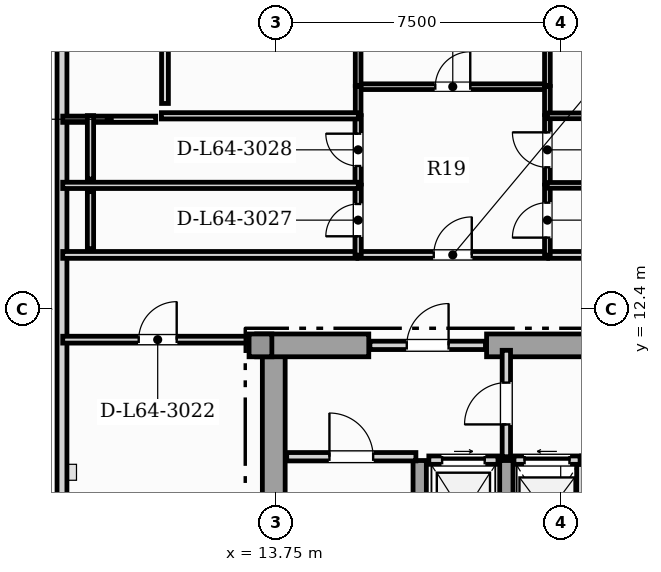
"""IFC4 building model, lengths in metres.
Left out: names, types, materials, properties, quantities, classifications, styles, units other than length and angle.
Written with IfcOpenShell. Run it as: python <this file> out.ifc"""

import sys

from ifc_helpers import new_model, si_unit, direction, frame, frame_2d, origin, origin_2d, place, context, subcontext, project, spatial, rectangle, extrude, element, fill, save


model = new_model("IFC4")
c1 = context("Model", 3, precision=1e-05, world=origin(), true_north=direction((0.0, 1.0)))
c2 = subcontext(c1, "Body", "Model", "MODEL_VIEW")
j1 = project(units=[si_unit("LENGTHUNIT", "METRE"), si_unit("PLANEANGLEUNIT", "RADIAN")], contexts=[c1])
p1 = place(None, origin())
s1 = spatial("IfcSite", under=j1, at=p1, CompositionType="ELEMENT")
p2 = place(p1, origin())
s2 = spatial("IfcBuilding", under=s1, at=p2, CompositionType="ELEMENT")
p3 = place(p2, frame((0.0, 0.0, 260.6)))
s3 = spatial("IfcBuildingStorey", under=s2, at=p3, CompositionType="ELEMENT", Elevation=260.6)
p4 = place(p3, frame((13.7, 0.92, 0.0), z_axis=(0.0, 0.0, 1.0), x_axis=(0.0, 1.0, 0.0)))
e1 = element("IfcWall", 1, at=p4, inside=s3, PredefinedType="SHEAR", context=c2, shape_type="SweptSolid", body=[
    extrude(rectangle(XDim=10.53, YDim=0.6, at=frame_2d((5.265, 0.0))), origin(), (0.0, 0.0, 1.0), 3.65),
])
p5 = place(p3, frame((13.25, 11.45, 0.0), z_axis=(0.0, 0.0, 1.0), x_axis=(1.0, 0.0, 0.0)))
e2 = element("IfcWall", 2, at=p5, inside=s3, PredefinedType="SHEAR", context=c2, shape_type="SweptSolid", body=[
    extrude(rectangle(XDim=2.95, YDim=0.6, at=frame_2d((1.475, 0.0))), origin(), (0.0, 0.0, 1.0), 3.65),
])
p6 = place(p3, frame((19.3, 11.45, 0.0), z_axis=(0.0, 0.0, 1.0), x_axis=(1.0, 0.0, 0.0)))
e3 = element("IfcWall", 3, at=p6, inside=s3, PredefinedType="SHEAR", context=c2, shape_type="SweptSolid", body=[
    extrude(rectangle(XDim=7.3, YDim=0.6, at=frame_2d((3.65, 0.0))), origin(), (0.0, 0.0, 1.0), 3.65),
])
for number, where, z_axis, x_axis in (
    (4, (17.54, 0.92, 0.0), (0.0, 0.0, 1.0), (0.0, 1.0, 0.0)),
    (5, (19.82, 0.92, 0.0), (0.0, 0.0, 1.0), (0.0, 1.0, 0.0)),
):
    element("IfcWall", number, at=place(p3, frame(where, z_axis=z_axis, x_axis=x_axis)), inside=s3, PredefinedType="SHEAR", context=c2, shape_type="SweptSolid", body=[
        extrude(rectangle(XDim=7.5, YDim=0.35, at=frame_2d((3.75, 0.0))), origin(), (0.0, 0.0, 1.0), 3.65),
    ])
p7 = place(p3, frame((13.35, 11.45, 0.0), z_axis=(0.0, 0.0, 1.0), x_axis=(1.0, 0.0, 0.0)))
e6 = element("IfcColumn", 6, at=p7, inside=s3, PredefinedType="COLUMN", context=c2, shape_type="SweptSolid", body=[
    extrude(rectangle(XDim=0.6, YDim=0.6, at=origin_2d()), origin(), (0.0, 0.0, 1.0), 3.85),
])
p8 = place(p3, frame((8.128, 20.34, 0.0), z_axis=(0.0, 0.0, 1.0), x_axis=(0.0, -1.0, 0.0)))
e7 = element("IfcWall", 7, at=p8, inside=s3, PredefinedType="SOLIDWALL", context=c2, shape_type="SweptSolid", body=[
    extrude(rectangle(XDim=17.1, YDim=0.26, at=frame_2d((8.55, 0.0))), origin(), (0.0, 0.0, 1.0), 3.65),
])
p9 = place(p8, frame((15.42, 0.0, 0.95)))
e8 = element("IfcOpeningElement", 8, at=p9, cuts=e7, PredefinedType="OPENING", context=c2, shape_type="SweptSolid", body=[
    extrude(rectangle(XDim=0.9, YDim=1.5, at=frame_2d((0.45, 0.75))), frame((0.0, 0.14, 0.0), z_axis=(0.0, -1.0, 0.0), x_axis=(1.0, 0.0, 0.0)), (0.0, 0.0, 1.0), 0.28),
])
p10 = place(p3, frame((17.78, 8.43, 0.0), z_axis=(0.0, 0.0, 1.0), x_axis=(1.0, 0.0, 0.0)))
e9 = element("IfcWall", 9, at=p10, inside=s3, PredefinedType="SOLIDWALL", context=c2, shape_type="SweptSolid", body=[
    extrude(rectangle(XDim=1.82, YDim=0.22, at=frame_2d((0.91, 0.0))), origin(), (0.0, 0.0, 1.0), 3.65),
])
p11 = place(p10, frame((0.35, 0.0, 0.0)))
e10 = element("IfcOpeningElement", 10, at=p11, cuts=e9, PredefinedType="OPENING", context=c2, shape_type="SweptSolid", body=[
    extrude(rectangle(XDim=1.12, YDim=2.25, at=frame_2d((0.56, 1.125))), frame((0.0, 0.12, 0.0), z_axis=(0.0, -1.0, 0.0), x_axis=(1.0, 0.0, 0.0)), (0.0, 0.0, 1.0), 0.24),
])
p12 = place(p3, frame((21.78, 5.65, 0.0), z_axis=(0.0, 0.0, 1.0), x_axis=(0.0, 1.0, 0.0)))
e11 = element("IfcWall", 11, at=p12, inside=s3, PredefinedType="SOLIDWALL", context=c2, shape_type="SweptSolid", body=[
    extrude(rectangle(XDim=2.7, YDim=0.22, at=frame_2d((1.35, 0.0))), origin(), (0.0, 0.0, 1.0), 3.65),
])
p13 = place(p3, frame((20.02, 8.43, 0.0), z_axis=(0.0, 0.0, 1.0), x_axis=(1.0, 0.0, 0.0)))
e12 = element("IfcWall", 12, at=p13, inside=s3, PredefinedType="SOLIDWALL", context=c2, shape_type="SweptSolid", body=[
    extrude(rectangle(XDim=1.74, YDim=0.22, at=frame_2d((0.87, 0.0))), origin(), (0.0, 0.0, 1.0), 3.65),
])
p14 = place(p13, frame((0.28, 0.0, 0.0)))
e13 = element("IfcOpeningElement", 13, at=p14, cuts=e12, PredefinedType="OPENING", context=c2, shape_type="SweptSolid", body=[
    extrude(rectangle(XDim=1.18, YDim=2.2, at=frame_2d((0.59, 1.1))), frame((0.0, 0.12, 0.0), z_axis=(0.0, -1.0, 0.0), x_axis=(1.0, 0.0, 0.0)), (0.0, 0.0, 1.0), 0.24),
])
p15 = place(p3, frame((21.8, 8.43, 0.0), z_axis=(0.0, 0.0, 1.0), x_axis=(1.0, 0.0, 0.0)))
e14 = element("IfcWall", 14, at=p15, inside=s3, PredefinedType="SOLIDWALL", context=c2, shape_type="SweptSolid", body=[
    extrude(rectangle(XDim=1.74, YDim=0.22, at=frame_2d((0.87, 0.0))), origin(), (0.0, 0.0, 1.0), 3.65),
])
p16 = place(p15, frame((0.28, 0.0, 0.0)))
e15 = element("IfcOpeningElement", 15, at=p16, cuts=e14, PredefinedType="OPENING", context=c2, shape_type="SweptSolid", body=[
    extrude(rectangle(XDim=1.18, YDim=2.2, at=frame_2d((0.59, 1.1))), frame((0.0, 0.12, 0.0), z_axis=(0.0, -1.0, 0.0), x_axis=(1.0, 0.0, 0.0)), (0.0, 0.0, 1.0), 0.24),
])
p17 = place(p3, frame((14.04, 8.52, 0.0), z_axis=(0.0, 0.0, 1.0), x_axis=(1.0, 0.0, 0.0)))
e16 = element("IfcWall", 16, at=p17, inside=s3, PredefinedType="SOLIDWALL", context=c2, shape_type="SweptSolid", body=[
    extrude(rectangle(XDim=3.4, YDim=0.22, at=frame_2d((1.7, 0.0))), origin(), (0.0, 0.0, 1.0), 3.65),
])
p18 = place(p17, frame((1.125, 0.0, 0.0)))
e17 = element("IfcOpeningElement", 17, at=p18, cuts=e16, PredefinedType="OPENING", context=c2, shape_type="SweptSolid", body=[
    extrude(rectangle(XDim=1.15, YDim=2.2, at=frame_2d((0.575, 1.1))), frame((0.0, 0.12, 0.0), z_axis=(0.0, -1.0, 0.0), x_axis=(1.0, 0.0, 0.0)), (0.0, 0.0, 1.0), 0.24),
])
p19 = place(p3, frame((19.82, 8.52, 0.0), z_axis=(0.0, 0.0, 1.0), x_axis=(0.0, 1.0, 0.0)))
e18 = element("IfcWall", 18, at=p19, inside=s3, PredefinedType="SOLIDWALL", context=c2, shape_type="SweptSolid", body=[
    extrude(rectangle(XDim=2.8, YDim=0.22, at=frame_2d((1.4, 0.0))), origin(), (0.0, 0.0, 1.0), 3.105),
])
p20 = place(p19, frame((0.85, 0.0, 0.0)))
e19 = element("IfcOpeningElement", 19, at=p20, cuts=e18, PredefinedType="OPENING", context=c2, shape_type="SweptSolid", body=[
    extrude(rectangle(XDim=1.1, YDim=2.2, at=frame_2d((0.55, 1.1))), frame((0.0, 0.12, 0.0), z_axis=(0.0, -1.0, 0.0), x_axis=(1.0, 0.0, 0.0)), (0.0, 0.0, 1.0), 0.24),
])
p21 = place(p3, frame((16.23, 11.45, 0.0), z_axis=(0.0, 0.0, 1.0), x_axis=(1.0, 0.0, 0.0)))
e20 = element("IfcWall", 20, at=p21, inside=s3, PredefinedType="SOLIDWALL", context=c2, shape_type="SweptSolid", body=[
    extrude(rectangle(XDim=3.04, YDim=0.22, at=frame_2d((1.52, 0.0))), origin(), (0.0, 0.0, 1.0), 3.65),
])
p22 = place(p21, frame((0.97, 0.0, 0.0)))
e21 = element("IfcOpeningElement", 21, at=p22, cuts=e20, PredefinedType="OPENING", context=c2, shape_type="SweptSolid", body=[
    extrude(rectangle(XDim=1.1, YDim=2.2, at=frame_2d((0.55, 1.1))), frame((0.0, 0.12, 0.0), z_axis=(0.0, -1.0, 0.0), x_axis=(1.0, 0.0, 0.0)), (0.0, 0.0, 1.0), 0.24),
])
p23 = place(p3, frame((8.147, 11.6, 0.0), z_axis=(0.0, 0.0, 1.0), x_axis=(1.0, 0.0, 0.0)))
e22 = element("IfcWall", 22, at=p23, inside=s3, PredefinedType="PARTITIONING", context=c2, shape_type="SweptSolid", body=[
    extrude(rectangle(XDim=4.998, YDim=0.18, at=frame_2d((2.499, 0.0))), origin(), (0.0, 0.0, 1.0), 3.65),
])
p24 = place(p23, frame((1.999, 0.0, 0.0)))
e23 = element("IfcOpeningElement", 23, at=p24, cuts=e22, PredefinedType="OPENING", context=c2, shape_type="SweptSolid", body=[
    extrude(rectangle(XDim=1.0, YDim=2.15, at=frame_2d((0.5, 1.075))), frame((0.0, 0.1, 0.0), z_axis=(0.0, -1.0, 0.0), x_axis=(1.0, 0.0, 0.0)), (0.0, 0.0, 1.0), 0.2),
])
p25 = place(p3, frame((15.915, 13.83, 0.0), z_axis=(0.0, 0.0, 1.0), x_axis=(1.0, 0.0, 0.0)))
e24 = element("IfcWall", 24, at=p25, inside=s3, PredefinedType="PARTITIONING", context=c2, shape_type="SweptSolid", body=[
    extrude(rectangle(XDim=4.99, YDim=0.18, at=frame_2d((2.495, 0.0))), origin(), (0.0, 0.0, 1.0), 3.65),
])
p26 = place(p25, frame((1.995, 0.0, 0.0)))
e25 = element("IfcOpeningElement", 25, at=p26, cuts=e24, PredefinedType="OPENING", context=c2, shape_type="SweptSolid", body=[
    extrude(rectangle(XDim=1.0, YDim=2.15, at=frame_2d((0.5, 1.075))), frame((0.0, 0.1, 0.0), z_axis=(0.0, -1.0, 0.0), x_axis=(1.0, 0.0, 0.0)), (0.0, 0.0, 1.0), 0.2),
])
p27 = place(p3, frame((8.147, 13.83, 0.0), z_axis=(0.0, 0.0, 1.0), x_axis=(1.0, 0.0, 0.0)))
e26 = element("IfcWall", 26, at=p27, inside=s3, PredefinedType="PARTITIONING", context=c2, shape_type="SweptSolid", body=[
    extrude(rectangle(XDim=7.738, YDim=0.18, at=frame_2d((3.869, 0.0))), origin(), (0.0, 0.0, 1.0), 3.65),
])
p28 = place(p3, frame((20.935, 13.83, 0.0), z_axis=(0.0, 0.0, 1.0), x_axis=(1.0, 0.0, 0.0)))
e27 = element("IfcWall", 27, at=p28, inside=s3, PredefinedType="PARTITIONING", context=c2, shape_type="SweptSolid", body=[
    extrude(rectangle(XDim=7.103, YDim=0.18, at=frame_2d((3.551, 0.0))), origin(), (0.0, 0.0, 1.0), 3.65),
])
p29 = place(p3, frame((15.915, 18.256, 0.0), z_axis=(0.0, 0.0, 1.0), x_axis=(1.0, 0.0, 0.0)))
e28 = element("IfcWall", 28, at=p29, inside=s3, PredefinedType="PARTITIONING", context=c2, shape_type="SweptSolid", body=[
    extrude(rectangle(XDim=4.99, YDim=0.15, at=frame_2d((2.495, 0.0))), origin(), (0.0, 0.0, 1.0), 3.65),
])
p30 = place(p29, frame((2.035, 0.0, 0.0)))
e29 = element("IfcOpeningElement", 29, at=p30, cuts=e28, PredefinedType="OPENING", context=c2, shape_type="SweptSolid", body=[
    extrude(rectangle(XDim=0.92, YDim=2.1, at=frame_2d((0.46, 1.05))), frame((0.0, 0.085, 0.0), z_axis=(0.0, -1.0, 0.0), x_axis=(1.0, 0.0, 0.0)), (0.0, 0.0, 1.0), 0.17),
])
p31 = place(p3, frame((15.92, 13.825, 0.0), z_axis=(0.0, 0.0, 1.0), x_axis=(0.0, 1.0, 0.0)))
e30 = element("IfcWall", 30, at=p31, inside=s3, PredefinedType="PLUMBINGWALL", context=c2, shape_type="SweptSolid", body=[
    extrude(rectangle(XDim=1.84, YDim=0.165, at=frame_2d((0.92, 0.0))), origin(), (0.0, 0.0, 1.0), 3.65),
])
p32 = place(p31, frame((0.495, 0.0, 0.0)))
e31 = element("IfcOpeningElement", 31, at=p32, cuts=e30, PredefinedType="OPENING", context=c2, shape_type="SweptSolid", body=[
    extrude(rectangle(XDim=0.85, YDim=2.1, at=frame_2d((0.425, 1.05))), frame((0.0, 0.093, 0.0), z_axis=(0.0, -1.0, 0.0), x_axis=(1.0, 0.0, 0.0)), (0.0, 0.0, 1.0), 0.185),
])
p33 = place(p3, frame((15.92, 15.695, 0.0), z_axis=(0.0, 0.0, 1.0), x_axis=(0.0, 1.0, 0.0)))
e32 = element("IfcWall", 32, at=p33, inside=s3, PredefinedType="PLUMBINGWALL", context=c2, shape_type="SweptSolid", body=[
    extrude(rectangle(XDim=1.8, YDim=0.165, at=frame_2d((0.9, 0.0))), origin(), (0.0, 0.0, 1.0), 3.65),
])
p34 = place(p33, frame((0.475, 0.0, 0.0)))
e33 = element("IfcOpeningElement", 33, at=p34, cuts=e32, PredefinedType="OPENING", context=c2, shape_type="SweptSolid", body=[
    extrude(rectangle(XDim=0.85, YDim=2.1, at=frame_2d((0.425, 1.05))), frame((0.0, 0.093, 0.0), z_axis=(0.0, -1.0, 0.0), x_axis=(1.0, 0.0, 0.0)), (0.0, 0.0, 1.0), 0.185),
])
p35 = place(p3, frame((15.92, 17.525, 0.0), z_axis=(0.0, 0.0, 1.0), x_axis=(0.0, 1.0, 0.0)))
e34 = element("IfcWall", 34, at=p35, inside=s3, PredefinedType="PARTITIONING", context=c2, shape_type="SweptSolid", body=[
    extrude(rectangle(XDim=0.736, YDim=0.15, at=frame_2d((0.368, 0.0))), origin(), (0.0, 0.0, 1.0), 3.65),
])
p36 = place(p3, frame((20.9, 13.825, 0.0), z_axis=(0.0, 0.0, 1.0), x_axis=(0.0, 1.0, 0.0)))
e35 = element("IfcWall", 35, at=p36, inside=s3, PredefinedType="PARTITIONING", context=c2, shape_type="SweptSolid", body=[
    extrude(rectangle(XDim=1.84, YDim=0.15, at=frame_2d((0.92, 0.0))), origin(), (0.0, 0.0, 1.0), 3.65),
])
p37 = place(p36, frame((0.46, 0.0, 0.0)))
e36 = element("IfcOpeningElement", 36, at=p37, cuts=e35, PredefinedType="OPENING", context=c2, shape_type="SweptSolid", body=[
    extrude(rectangle(XDim=0.92, YDim=2.1, at=frame_2d((0.46, 1.05))), frame((0.0, 0.085, 0.0), z_axis=(0.0, -1.0, 0.0), x_axis=(1.0, 0.0, 0.0)), (0.0, 0.0, 1.0), 0.17),
])
p38 = place(p3, frame((20.9, 15.695, 0.0), z_axis=(0.0, 0.0, 1.0), x_axis=(0.0, 1.0, 0.0)))
e37 = element("IfcWall", 37, at=p38, inside=s3, PredefinedType="PARTITIONING", context=c2, shape_type="SweptSolid", body=[
    extrude(rectangle(XDim=1.8, YDim=0.15, at=frame_2d((0.9, 0.0))), origin(), (0.0, 0.0, 1.0), 3.65),
])
p39 = place(p38, frame((0.44, 0.0, 0.0)))
e38 = element("IfcOpeningElement", 38, at=p39, cuts=e37, PredefinedType="OPENING", context=c2, shape_type="SweptSolid", body=[
    extrude(rectangle(XDim=0.92, YDim=2.1, at=frame_2d((0.46, 1.05))), frame((0.0, 0.085, 0.0), z_axis=(0.0, -1.0, 0.0), x_axis=(1.0, 0.0, 0.0)), (0.0, 0.0, 1.0), 0.17),
])
p40 = place(p3, frame((20.9, 17.525, 0.0), z_axis=(0.0, 0.0, 1.0), x_axis=(0.0, 1.0, 0.0)))
e39 = element("IfcWall", 39, at=p40, inside=s3, PredefinedType="PARTITIONING", context=c2, shape_type="SweptSolid", body=[
    extrude(rectangle(XDim=0.736, YDim=0.15, at=frame_2d((0.368, 0.0))), origin(), (0.0, 0.0, 1.0), 3.65),
])
p41 = place(p3, frame((15.92, 18.291, 0.0), z_axis=(0.0, 0.0, 1.0), x_axis=(0.0, 1.0, 0.0)))
e40 = element("IfcWall", 40, at=p41, inside=s3, PredefinedType="PARTITIONING", context=c2, shape_type="SweptSolid", body=[
    extrude(rectangle(XDim=8.714, YDim=0.15, at=frame_2d((4.357, 0.0))), origin(), (0.0, 0.0, 1.0), 3.65),
])
p42 = place(p41, frame((3.897, 0.0, 0.0)))
e41 = element("IfcOpeningElement", 41, at=p42, cuts=e40, PredefinedType="OPENING", context=c2, shape_type="SweptSolid", body=[
    extrude(rectangle(XDim=0.92, YDim=2.1, at=frame_2d((0.46, 1.05))), frame((0.0, 0.085, 0.0), z_axis=(0.0, -1.0, 0.0), x_axis=(1.0, 0.0, 0.0)), (0.0, 0.0, 1.0), 0.17),
])
p43 = place(p3, frame((20.9, 18.291, 0.0), z_axis=(0.0, 0.0, 1.0), x_axis=(0.0, 1.0, 0.0)))
e42 = element("IfcWall", 42, at=p43, inside=s3, PredefinedType="PARTITIONING", context=c2, shape_type="SweptSolid", body=[
    extrude(rectangle(XDim=3.182, YDim=0.15, at=frame_2d((1.591, 0.0))), origin(), (0.0, 0.0, 1.0), 3.65),
])
p44 = place(p43, frame((1.131, 0.0, 0.0)))
e43 = element("IfcOpeningElement", 43, at=p44, cuts=e42, PredefinedType="OPENING", context=c2, shape_type="SweptSolid", body=[
    extrude(rectangle(XDim=0.92, YDim=2.1, at=frame_2d((0.46, 1.05))), frame((0.0, 0.085, 0.0), z_axis=(0.0, -1.0, 0.0), x_axis=(1.0, 0.0, 0.0)), (0.0, 0.0, 1.0), 0.17),
])
p45 = place(p3, frame((8.147, 15.66, 0.0), z_axis=(0.0, 0.0, 1.0), x_axis=(1.0, 0.0, 0.0)))
e44 = element("IfcWall", 44, at=p45, inside=s3, PredefinedType="PLUMBINGWALL", context=c2, shape_type="SweptSolid", body=[
    extrude(rectangle(XDim=7.778, YDim=0.165, at=frame_2d((3.889, 0.0))), origin(), (0.0, 0.0, 1.0), 3.65),
])
p46 = place(p3, frame((10.743, 17.49, 0.0), z_axis=(0.0, 0.0, 1.0), x_axis=(1.0, 0.0, 0.0)))
e45 = element("IfcWall", 45, at=p46, inside=s3, PredefinedType="PLUMBINGWALL", context=c2, shape_type="SweptSolid", body=[
    extrude(rectangle(XDim=5.182, YDim=0.165, at=frame_2d((2.591, 0.0))), origin(), (0.0, 0.0, 1.0), 3.65),
])
for number, where, z_axis, x_axis in (
    (46, (20.895, 15.66, 0.0), (0.0, 0.0, 1.0), (1.0, 0.0, 0.0)),
    (47, (20.895, 17.49, 0.0), (0.0, 0.0, 1.0), (1.0, 0.0, 0.0)),
):
    element("IfcWall", number, at=place(p3, frame(where, z_axis=z_axis, x_axis=x_axis)), inside=s3, PredefinedType="PARTITIONING", context=c2, shape_type="SweptSolid", body=[
        extrude(rectangle(XDim=7.143, YDim=0.15, at=frame_2d((3.571, 0.0))), origin(), (0.0, 0.0, 1.0), 3.65),
    ])
p47 = place(p3, frame((8.878, 13.995, 0.0), z_axis=(0.0, 0.0, 1.0), x_axis=(0.0, 1.0, 0.0)))
e48 = element("IfcWall", 48, at=p47, inside=s3, PredefinedType="PLUMBINGWALL", context=c2, shape_type="SweptSolid", body=[
    extrude(rectangle(XDim=1.5, YDim=0.165, at=frame_2d((0.75, 0.0))), origin(), (0.0, 0.0, 1.0), 3.65),
])
p48 = place(p3, frame((8.147, 17.4, 0.0), z_axis=(0.0, 0.0, 1.0), x_axis=(1.0, 0.0, 0.0)))
e49 = element("IfcWall", 49, at=p48, inside=s3, PredefinedType="PLUMBINGWALL", context=c2, shape_type="SweptSolid", body=[
    extrude(rectangle(XDim=2.447, YDim=0.165, at=frame_2d((1.223, 0.0))), origin(), (0.0, 0.0, 1.0), 3.65),
])
p49 = place(p3, frame((8.878, 15.825, 0.0), z_axis=(0.0, 0.0, 1.0), x_axis=(0.0, 1.0, 0.0)))
e50 = element("IfcWall", 50, at=p49, inside=s3, PredefinedType="PLUMBINGWALL", context=c2, shape_type="SweptSolid", body=[
    extrude(rectangle(XDim=1.67, YDim=0.165, at=frame_2d((0.835, 0.0))), origin(), (0.0, 0.0, 1.0), 3.65),
])
p50 = place(p3, frame((10.838, 17.815, 0.0), z_axis=(0.0, 0.0, 1.0), x_axis=(0.0, 1.0, 0.0)))
e51 = element("IfcWall", 51, at=p50, inside=s3, PredefinedType="PARTITIONING", context=c2, shape_type="SweptSolid", body=[
    extrude(rectangle(XDim=1.424, YDim=0.18, at=frame_2d((0.712, 0.0))), origin(), (0.0, 0.0, 1.0), 3.65),
])
p51 = place(p11, origin())
e52 = element("IfcDoor", 52, at=p51, inside=s3, OperationType="SLIDING_TO_RIGHT", PredefinedType="DOOR", context=c2, shape_type="SweptSolid", body=[
    extrude(rectangle(XDim=1.12, YDim=2.25, at=frame_2d((0.56, 1.125))), frame((0.0, 0.025, 0.0), z_axis=(0.0, -1.0, 0.0), x_axis=(1.0, 0.0, 0.0)), (0.0, 0.0, 1.0), 0.05),
])
fill(e10, e52)
p52 = place(p14, origin())
e53 = element("IfcDoor", 53, at=p52, inside=s3, OperationType="SLIDING_TO_LEFT", PredefinedType="DOOR", context=c2, shape_type="SweptSolid", body=[
    extrude(rectangle(XDim=1.18, YDim=2.2, at=frame_2d((0.59, 1.1))), frame((0.0, 0.025, 0.0), z_axis=(0.0, -1.0, 0.0), x_axis=(1.0, 0.0, 0.0)), (0.0, 0.0, 1.0), 0.05),
])
fill(e13, e53)
p53 = place(p18, origin())
e54 = element("IfcDoor", 54, at=p53, inside=s3, OperationType="SINGLE_SWING_LEFT", PredefinedType="DOOR", context=c2, shape_type="SweptSolid", body=[
    extrude(rectangle(XDim=1.15, YDim=2.2, at=frame_2d((0.575, 1.1))), frame((0.0, 0.025, 0.0), z_axis=(0.0, -1.0, 0.0), x_axis=(1.0, 0.0, 0.0)), (0.0, 0.0, 1.0), 0.05),
])
fill(e17, e54)
p54 = place(p20, origin())
e55 = element("IfcDoor", 55, at=p54, inside=s3, OperationType="SINGLE_SWING_LEFT", PredefinedType="DOOR", context=c2, shape_type="SweptSolid", body=[
    extrude(rectangle(XDim=1.1, YDim=2.2, at=frame_2d((0.55, 1.1))), frame((0.0, 0.025, 0.0), z_axis=(0.0, -1.0, 0.0), x_axis=(1.0, 0.0, 0.0)), (0.0, 0.0, 1.0), 0.05),
])
fill(e19, e55)
p55 = place(p22, origin())
e56 = element("IfcDoor", 56, at=p55, inside=s3, OperationType="SINGLE_SWING_RIGHT", PredefinedType="DOOR", context=c2, shape_type="SweptSolid", body=[
    extrude(rectangle(XDim=1.1, YDim=2.2, at=frame_2d((0.55, 1.1))), frame((0.0, 0.025, 0.0), z_axis=(0.0, -1.0, 0.0), x_axis=(1.0, 0.0, 0.0)), (0.0, 0.0, 1.0), 0.05),
])
fill(e21, e56)
p56 = place(p24, origin())
e57 = element("IfcDoor", 57, at=p56, inside=s3, OperationType="SINGLE_SWING_RIGHT", PredefinedType="DOOR", context=c2, shape_type="SweptSolid", body=[
    extrude(rectangle(XDim=1.0, YDim=2.15, at=frame_2d((0.5, 1.075))), frame((0.0, 0.025, 0.0), z_axis=(0.0, -1.0, 0.0), x_axis=(1.0, 0.0, 0.0)), (0.0, 0.0, 1.0), 0.05),
])
fill(e23, e57)
p57 = place(p26, origin())
e58 = element("IfcDoor", 58, at=p57, inside=s3, OperationType="SINGLE_SWING_RIGHT", PredefinedType="DOOR", context=c2, shape_type="SweptSolid", body=[
    extrude(rectangle(XDim=1.0, YDim=2.15, at=frame_2d((0.5, 1.075))), frame((0.0, 0.025, 0.0), z_axis=(0.0, -1.0, 0.0), x_axis=(1.0, 0.0, 0.0)), (0.0, 0.0, 1.0), 0.05),
])
fill(e25, e58)
p58 = place(p30, origin())
e59 = element("IfcDoor", 59, at=p58, inside=s3, OperationType="SINGLE_SWING_RIGHT", PredefinedType="DOOR", context=c2, shape_type="SweptSolid", body=[
    extrude(rectangle(XDim=0.92, YDim=2.1, at=frame_2d((0.46, 1.05))), frame((0.0, 0.025, 0.0), z_axis=(0.0, -1.0, 0.0), x_axis=(1.0, 0.0, 0.0)), (0.0, 0.0, 1.0), 0.05),
])
fill(e29, e59)
p59 = place(p32, origin())
e60 = element("IfcDoor", 60, at=p59, inside=s3, OperationType="SINGLE_SWING_LEFT", PredefinedType="DOOR", context=c2, shape_type="SweptSolid", body=[
    extrude(rectangle(XDim=0.85, YDim=2.1, at=frame_2d((0.425, 1.05))), frame((0.0, 0.025, 0.0), z_axis=(0.0, -1.0, 0.0), x_axis=(1.0, 0.0, 0.0)), (0.0, 0.0, 1.0), 0.05),
])
fill(e31, e60)
p60 = place(p34, origin())
e61 = element("IfcDoor", 61, at=p60, inside=s3, OperationType="SINGLE_SWING_RIGHT", PredefinedType="DOOR", context=c2, shape_type="SweptSolid", body=[
    extrude(rectangle(XDim=0.85, YDim=2.1, at=frame_2d((0.425, 1.05))), frame((0.0, 0.025, 0.0), z_axis=(0.0, -1.0, 0.0), x_axis=(1.0, 0.0, 0.0)), (0.0, 0.0, 1.0), 0.05),
])
fill(e33, e61)
p61 = place(p37, origin())
e62 = element("IfcDoor", 62, at=p61, inside=s3, OperationType="SINGLE_SWING_LEFT", PredefinedType="DOOR", context=c2, shape_type="SweptSolid", body=[
    extrude(rectangle(XDim=0.92, YDim=2.1, at=frame_2d((0.46, 1.05))), frame((0.0, 0.025, 0.0), z_axis=(0.0, -1.0, 0.0), x_axis=(1.0, 0.0, 0.0)), (0.0, 0.0, 1.0), 0.05),
])
fill(e36, e62)
p62 = place(p39, origin())
e63 = element("IfcDoor", 63, at=p62, inside=s3, OperationType="SINGLE_SWING_RIGHT", PredefinedType="DOOR", context=c2, shape_type="SweptSolid", body=[
    extrude(rectangle(XDim=0.92, YDim=2.1, at=frame_2d((0.46, 1.05))), frame((0.0, 0.025, 0.0), z_axis=(0.0, -1.0, 0.0), x_axis=(1.0, 0.0, 0.0)), (0.0, 0.0, 1.0), 0.05),
])
fill(e38, e63)
save(model, sys.argv[1])
